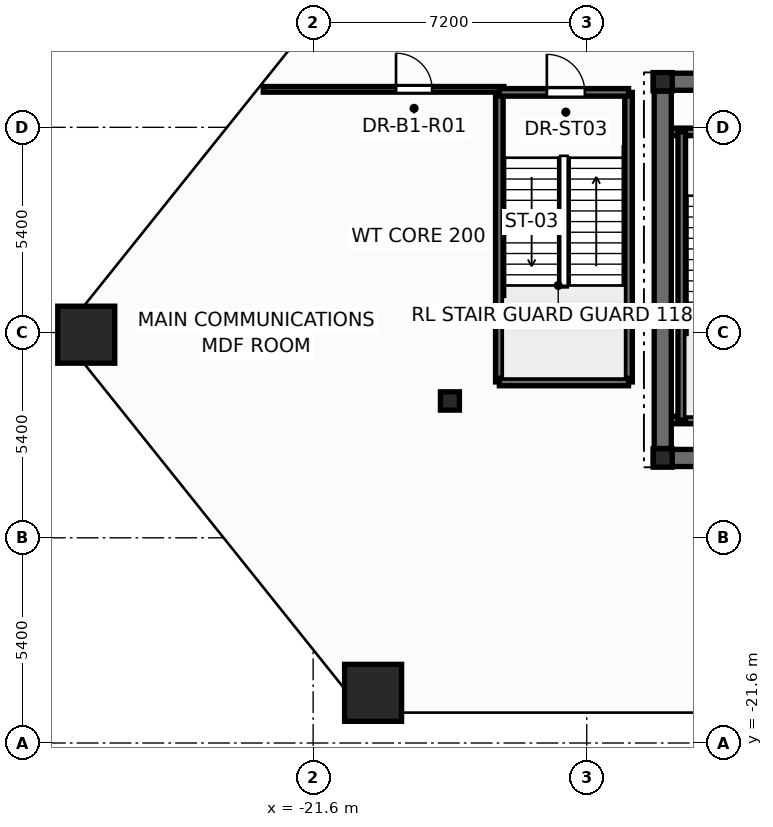
"""IFC4 building model, lengths in metres.
Left out: names, types, materials, properties, quantities, classifications, styles, units other than length and angle.
Written with IfcOpenShell. Run it as: python <this file> out.ifc"""

import sys

from ifc_helpers import new_model, si_unit, direction, frame, frame_2d, origin, origin_2d, place, context, subcontext, project, spatial, rectangle, hollow_rectangle, i_section, extrude, element, fill, save


model = new_model("IFC4")
c1 = context("Model", 3, precision=1e-05, world=origin(), true_north=direction((0.0, 1.0)))
c2 = subcontext(c1, "Body", "Model", "MODEL_VIEW")
j1 = project(units=[si_unit("LENGTHUNIT", "METRE"), si_unit("PLANEANGLEUNIT", "RADIAN")], contexts=[c1])
p1 = place(None, origin())
s1 = spatial("IfcSite", under=j1, at=p1, CompositionType="ELEMENT")
p2 = place(p1, origin())
s2 = spatial("IfcBuilding", under=s1, at=p2, CompositionType="ELEMENT")
p3 = place(p2, frame((0.0, 0.0, -4.8)))
s3 = spatial("IfcBuildingStorey", under=s2, at=p3, CompositionType="ELEMENT", Elevation=-4.8)
for number, where, z_axis, x_axis in (
    (1, (-27.57, -10.856, 0.0), (0.0, 0.0, 1.0), (1.0, 0.0, 0.0)),
    (2, (-20.022, -20.28, 0.0), (0.0, 0.0, 1.0), (1.0, 0.0, 0.0)),
):
    element("IfcColumn", number, at=place(p3, frame(where, z_axis=z_axis, x_axis=x_axis)), inside=s3, PredefinedType="COLUMN", context=c2, shape_type="SweptSolid", body=[
        extrude(hollow_rectangle(XDim=1.5, YDim=1.5, WallThickness=0.075, at=origin_2d()), origin(), (0.0, 0.0, 1.0), 4.8),
    ])
for number, where, z_axis, x_axis in (
    (3, (-12.4, -14.1, 0.0), (0.0, 0.0, 1.0), (1.0, 0.0, 0.0)),
    (4, (-12.4, -4.2, 0.0), (0.0, 0.0, 1.0), (1.0, 0.0, 0.0)),
    (5, (-18.0, -12.6, 0.0), (0.0, 0.0, 1.0), (1.0, 0.0, 0.0)),
):
    element("IfcColumn", number, at=place(p3, frame(where, z_axis=z_axis, x_axis=x_axis)), inside=s3, PredefinedType="COLUMN", context=c2, shape_type="SweptSolid", body=[
        extrude(i_section(OverallWidth=0.5, OverallDepth=0.482, WebThickness=0.04, FlangeThickness=0.045, at=origin_2d()), origin(), (0.0, 0.0, 1.0), 4.8),
    ])
p4 = place(p3, frame((-12.65, -14.1, 0.0), z_axis=(0.0, 0.0, 1.0), x_axis=(1.0, 0.0, 0.0)))
e6 = element("IfcWall", 6, at=p4, inside=s3, PredefinedType="SHEAR", context=c2, shape_type="SweptSolid", body=[
    extrude(rectangle(XDim=25.3, YDim=0.45, at=frame_2d((12.65, 0.0))), origin(), (0.0, 0.0, 1.0), 4.8),
])
p5 = place(p3, frame((-12.65, -4.2, 0.0), z_axis=(0.0, 0.0, 1.0), x_axis=(1.0, 0.0, 0.0)))
e7 = element("IfcWall", 7, at=p5, inside=s3, PredefinedType="SHEAR", context=c2, shape_type="SweptSolid", body=[
    extrude(rectangle(XDim=25.3, YDim=0.45, at=frame_2d((12.65, 0.0))), origin(), (0.0, 0.0, 1.0), 4.8),
])
p6 = place(p5, frame((1.85, 0.0, 0.0)))
e8 = element("IfcOpeningElement", 8, at=p6, cuts=e7, PredefinedType="OPENING", context=c2, shape_type="SweptSolid", body=[
    extrude(rectangle(XDim=0.756, YDim=2.054, at=frame_2d((0.375, 1.027))), frame((0.0, 0.235, 0.0), z_axis=(0.0, -1.0, 0.0), x_axis=(1.0, 0.0, 0.0)), (0.0, 0.0, 1.0), 0.47),
])
p7 = place(p5, frame((22.65, 0.0, 0.0)))
e9 = element("IfcOpeningElement", 9, at=p7, cuts=e7, PredefinedType="OPENING", context=c2, shape_type="SweptSolid", body=[
    extrude(rectangle(XDim=0.756, YDim=2.054, at=frame_2d((0.375, 1.027))), frame((0.0, 0.235, 0.0), z_axis=(0.0, -1.0, 0.0), x_axis=(1.0, 0.0, 0.0)), (0.0, 0.0, 1.0), 0.47),
])
p8 = place(p5, frame((5.85, 0.0, 0.0)))
e10 = element("IfcOpeningElement", 10, at=p8, cuts=e7, PredefinedType="OPENING", context=c2, shape_type="SweptSolid", body=[
    extrude(rectangle(XDim=1.006, YDim=2.104, at=frame_2d((0.5, 1.052))), frame((0.0, 0.235, 0.0), z_axis=(0.0, -1.0, 0.0), x_axis=(1.0, 0.0, 0.0)), (0.0, 0.0, 1.0), 0.47),
])
p9 = place(p5, frame((10.35, 0.0, 0.0)))
e11 = element("IfcOpeningElement", 11, at=p9, cuts=e7, PredefinedType="OPENING", context=c2, shape_type="SweptSolid", body=[
    extrude(rectangle(XDim=1.406, YDim=2.154, at=frame_2d((0.7, 1.077))), frame((0.0, 0.235, 0.0), z_axis=(0.0, -1.0, 0.0), x_axis=(1.0, 0.0, 0.0)), (0.0, 0.0, 1.0), 0.47),
])
p10 = place(p5, frame((18.45, 0.0, 0.0)))
e12 = element("IfcOpeningElement", 12, at=p10, cuts=e7, PredefinedType="OPENING", context=c2, shape_type="SweptSolid", body=[
    extrude(rectangle(XDim=1.006, YDim=2.104, at=frame_2d((0.5, 1.052))), frame((0.0, 0.235, 0.0), z_axis=(0.0, -1.0, 0.0), x_axis=(1.0, 0.0, 0.0)), (0.0, 0.0, 1.0), 0.47),
])
for number, where, z_axis, x_axis in (
    (13, (-12.35, -5.52, 0.0), (0.0, 0.0, 1.0), (1.0, 0.0, 0.0)),
    (14, (-12.35, -13.1, 0.0), (0.0, 0.0, 1.0), (1.0, 0.0, 0.0)),
):
    element("IfcWall", number, at=place(p3, frame(where, z_axis=z_axis, x_axis=x_axis)), inside=s3, PredefinedType="SOLIDWALL", context=c2, shape_type="SweptSolid", body=[
        extrude(rectangle(XDim=3.87, YDim=0.2, at=frame_2d((1.935, 0.0))), origin(), (0.0, 0.0, 1.0), 4.8),
    ])
p11 = place(p3, frame((-11.9, -13.1, 0.0), z_axis=(0.0, 0.0, 1.0), x_axis=(0.0, 1.0, 0.0)))
e15 = element("IfcWall", 15, at=p11, inside=s3, PredefinedType="SOLIDWALL", context=c2, shape_type="SweptSolid", body=[
    extrude(rectangle(XDim=7.58, YDim=0.2, at=frame_2d((3.79, 0.0))), origin(), (0.0, 0.0, 1.0), 4.8),
])
p12 = place(p3, frame((-12.4, -13.85, 0.0), z_axis=(0.0, 0.0, 1.0), x_axis=(0.0, 1.0, 0.0)))
e16 = element("IfcWall", 16, at=p12, inside=s3, PredefinedType="SHEAR", context=c2, shape_type="SweptSolid", body=[
    extrude(rectangle(XDim=9.4, YDim=0.45, at=frame_2d((4.7, 0.0))), origin(), (0.0, 0.0, 1.0), 4.8),
])
for number, where, z_axis, x_axis in (
    (17, (-16.7, -12.1, 0.0), (0.0, 0.0, 1.0), (0.0, 1.0, 0.0)),
    (18, (-13.3, -12.1, 0.0), (0.0, 0.0, 1.0), (0.0, 1.0, 0.0)),
):
    element("IfcWall", number, at=place(p3, frame(where, z_axis=z_axis, x_axis=x_axis)), inside=s3, PredefinedType="SOLIDWALL", context=c2, shape_type="SweptSolid", body=[
        extrude(rectangle(XDim=7.62, YDim=0.2, at=frame_2d((3.81, 0.0))), origin(), (0.0, 0.0, 1.0), 4.8),
    ])
p13 = place(p3, frame((-22.912, -4.4, 0.0), z_axis=(0.0, 0.0, 1.0), x_axis=(1.0, 0.0, 0.0)))
e19 = element("IfcWall", 19, at=p13, inside=s3, PredefinedType="PARTITIONING", context=c2, shape_type="SweptSolid", body=[
    extrude(rectangle(XDim=6.332, YDim=0.15, at=frame_2d((3.166, 0.0))), origin(), (0.0, 0.0, 1.0), 3.844),
])
p14 = place(p13, frame((3.493, 0.0, 0.0)))
e20 = element("IfcOpeningElement", 20, at=p14, cuts=e19, PredefinedType="OPENING", context=c2, shape_type="SweptSolid", body=[
    extrude(rectangle(XDim=0.956, YDim=2.104, at=frame_2d((0.475, 1.052))), frame((0.0, 0.085, 0.0), z_axis=(0.0, -1.0, 0.0), x_axis=(1.0, 0.0, 0.0)), (0.0, 0.0, 1.0), 0.17),
])
p15 = place(p3, frame((-16.7, -12.1, 0.0), z_axis=(0.0, 0.0, 1.0), x_axis=(1.0, 0.0, 0.0)))
e21 = element("IfcWall", 21, at=p15, inside=s3, PredefinedType="SOLIDWALL", context=c2, shape_type="SweptSolid", body=[
    extrude(rectangle(XDim=3.4, YDim=0.2, at=frame_2d((1.7, 0.0))), origin(), (0.0, 0.0, 1.0), 4.8),
])
p16 = place(p3, frame((-16.7, -4.48, 0.0), z_axis=(0.0, 0.0, 1.0), x_axis=(1.0, 0.0, 0.0)))
e22 = element("IfcWall", 22, at=p16, inside=s3, PredefinedType="SOLIDWALL", context=c2, shape_type="SweptSolid", body=[
    extrude(rectangle(XDim=3.4, YDim=0.2, at=frame_2d((1.7, 0.0))), origin(), (0.0, 0.0, 1.0), 4.8),
])
p17 = place(p16, frame((1.25, 0.0, 0.0)))
e23 = element("IfcOpeningElement", 23, at=p17, cuts=e22, PredefinedType="OPENING", context=c2, shape_type="SweptSolid", body=[
    extrude(rectangle(XDim=1.006, YDim=2.104, at=frame_2d((0.5, 1.052))), frame((0.0, 0.11, 0.0), z_axis=(0.0, -1.0, 0.0), x_axis=(1.0, 0.0, 0.0)), (0.0, 0.0, 1.0), 0.22),
])
p18 = place(p17, origin())
e24 = element("IfcDoor", 24, at=p18, inside=s3, OperationType="SINGLE_SWING_LEFT", PredefinedType="DOOR", context=c2, shape_type="SweptSolid", body=[
    extrude(rectangle(XDim=1.0, YDim=2.1, at=frame_2d((0.5, 1.05))), frame((0.0, 0.025, 0.0), z_axis=(0.0, -1.0, 0.0), x_axis=(1.0, 0.0, 0.0)), (0.0, 0.0, 1.0), 0.05),
])
fill(e23, e24)
p19 = place(p14, origin())
e25 = element("IfcDoor", 25, at=p19, inside=s3, OperationType="SINGLE_SWING_LEFT", PredefinedType="DOOR", context=c2, shape_type="SweptSolid", body=[
    extrude(rectangle(XDim=0.95, YDim=2.1, at=frame_2d((0.475, 1.05))), frame((0.0, 0.025, 0.0), z_axis=(0.0, -1.0, 0.0), x_axis=(1.0, 0.0, 0.0)), (0.0, 0.0, 1.0), 0.05),
])
fill(e20, e25)
save(model, sys.argv[1])
